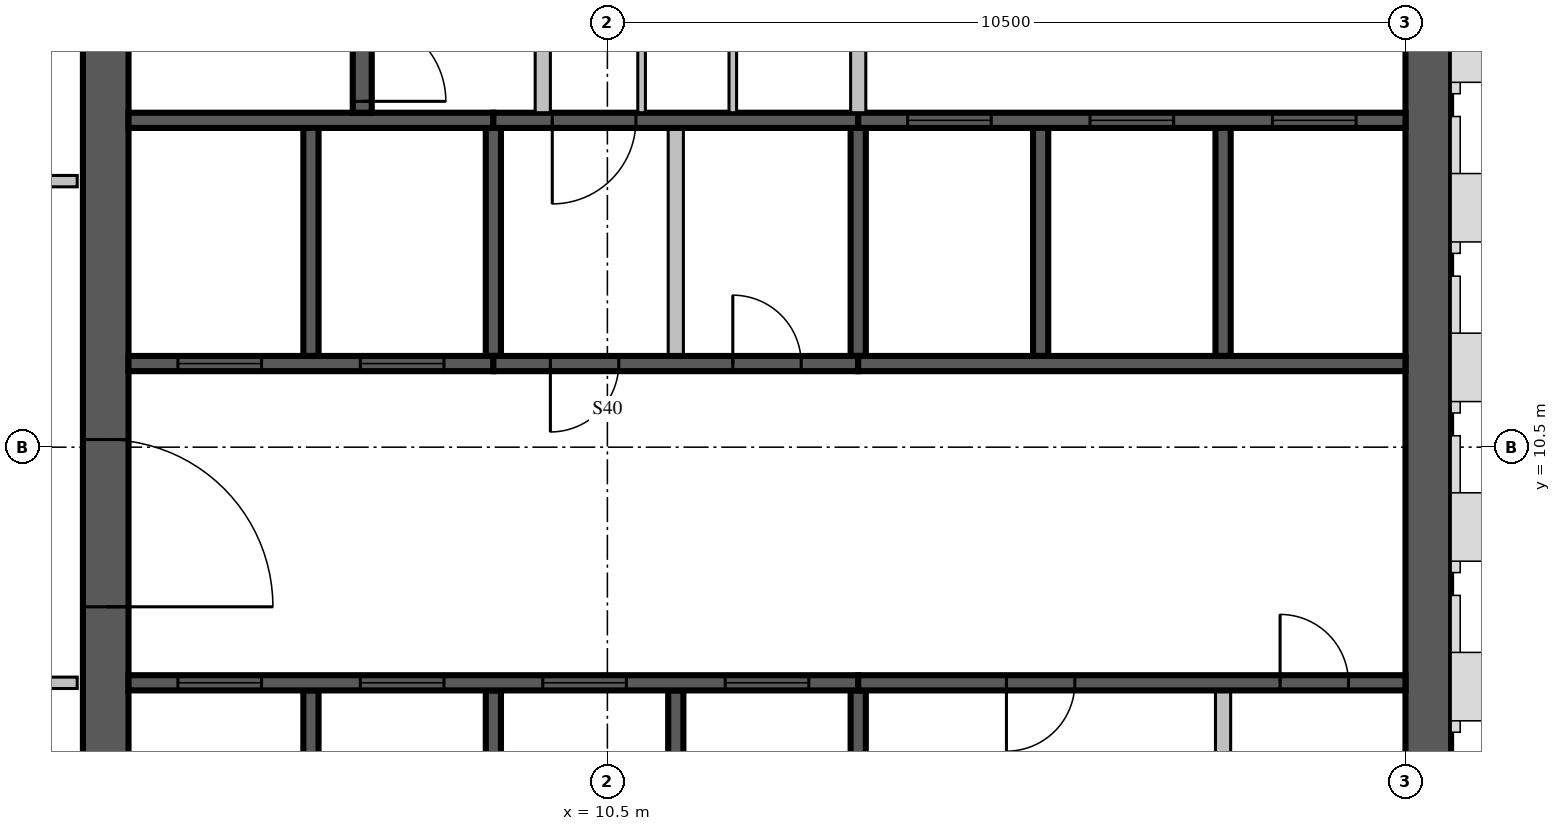
"""IFC4 building model, lengths in metres.
Left out: names, types, materials, properties, quantities, classifications, styles, units other than length and angle.
Written with IfcOpenShell. Run it as: python <this file> out.ifc"""

import sys

from ifc_helpers import new_model, si_unit, direction, frame, frame_2d, origin, place, context, subcontext, project, spatial, rectangle, extrude, source, transform, mapped, element, fill, save


model = new_model("IFC4")
c1 = context("Model", 3, precision=1e-05, world=origin(), true_north=direction((0.0, 1.0)))
c2 = subcontext(c1, "Body", "Model", "MODEL_VIEW")
j1 = project(units=[si_unit("LENGTHUNIT", "METRE"), si_unit("PLANEANGLEUNIT", "RADIAN")], contexts=[c1])
p1 = place(None, origin())
s1 = spatial("IfcSite", under=j1, at=p1, CompositionType="ELEMENT")
p2 = place(p1, origin())
s2 = spatial("IfcBuilding", under=s1, at=p2, CompositionType="ELEMENT")
p3 = place(p2, frame((0.0, 0.0, 340.5)))
s3 = spatial("IfcBuildingStorey", under=s2, at=p3, CompositionType="ELEMENT", Elevation=340.5)
m1 = source(origin(), c2, "Body", "SweptSolid", [
    extrude(rectangle(XDim=17.4, YDim=0.6, at=frame_2d((8.7, 0.0))), origin(), (0.0, 0.0, 1.0), 3.5),
])
p4 = place(p3, frame((3.9, 4.2, 0.0), z_axis=(0.0, 0.0, 1.0), x_axis=(0.0, 1.0, 0.0)))
e1 = element("IfcWall", 1, at=p4, inside=s3, PredefinedType="SHEAR", context=c2, shape_type="MappedRepresentation", body=[
    mapped(m1, transform((0.0, 0.0, 0.0), scale=1.0)),
])
m2 = source(origin(), c2, "Body", "SweptSolid", [
    extrude(rectangle(XDim=2.2, YDim=2.1, at=frame_2d((1.1, 1.05))), frame((0.0, 0.31, 0.0), z_axis=(0.0, -1.0, 0.0), x_axis=(1.0, 0.0, 0.0)), (0.0, 0.0, 1.0), 0.62),
])
p5 = place(p4, frame((4.2, 0.0, 0.0)))
e2 = element("IfcOpeningElement", 2, at=p5, cuts=e1, PredefinedType="OPENING", context=c2, shape_type="MappedRepresentation", body=[
    mapped(m2, transform((0.0, 0.0, 0.0), scale=1.0)),
])
m3 = source(origin(), c2, "Body", "SweptSolid", [
    extrude(rectangle(XDim=16.8, YDim=0.6, at=frame_2d((8.4, 0.0))), origin(), (0.0, 0.0, 1.0), 3.5),
])
p6 = place(p3, frame((21.3, 4.2, 0.0), z_axis=(0.0, 0.0, 1.0), x_axis=(0.0, 1.0, 0.0)))
e3 = element("IfcWall", 3, at=p6, inside=s3, PredefinedType="SHEAR", context=c2, shape_type="MappedRepresentation", body=[
    mapped(m3, transform((0.0, 0.0, 0.0), scale=1.0)),
])
m4 = source(origin(), c2, "Body", "SweptSolid", [
    extrude(rectangle(XDim=1.2, YDim=2.4, at=frame_2d((0.6, 1.2))), frame((0.0, 0.31, 0.0), z_axis=(0.0, -1.0, 0.0), x_axis=(1.0, 0.0, 0.0)), (0.0, 0.0, 1.0), 0.62),
])
p7 = place(p6, frame((12.0, 0.0, 0.6)))
e4 = element("IfcOpeningElement", 4, at=p7, cuts=e3, PredefinedType="OPENING", context=c2, shape_type="MappedRepresentation", body=[
    mapped(m4, transform((0.0, 0.0, 0.0), scale=1.0)),
])
m5 = source(origin(), c2, "Body", "SweptSolid", [
    extrude(rectangle(XDim=3.1, YDim=0.2, at=frame_2d((1.55, 0.0))), origin(), (0.0, 0.0, 1.0), 3.5),
])
for number, where, z_axis, x_axis in (
    (5, (6.6, 4.2, 0.0), (0.0, 0.0, 1.0), (0.0, 1.0, 0.0)),
    (6, (9.0, 4.2, 0.0), (0.0, 0.0, 1.0), (0.0, 1.0, 0.0)),
    (7, (11.4, 4.2, 0.0), (0.0, 0.0, 1.0), (0.0, 1.0, 0.0)),
):
    element("IfcWall", number, at=place(p3, frame(where, z_axis=z_axis, x_axis=x_axis)), inside=s3, PredefinedType="SOLIDWALL", context=c2, shape_type="MappedRepresentation", body=[
        mapped(m5, transform((0.0, 0.0, 0.0), scale=1.0)),
    ])
m6 = source(origin(), c2, "Body", "SweptSolid", [
    extrude(rectangle(XDim=3.1, YDim=0.2, at=frame_2d((1.55, 0.0))), origin(), (0.0, 0.0, 1.0), 3.1),
])
p8 = place(p3, frame((13.8, 4.2, 0.0), z_axis=(0.0, 0.0, 1.0), x_axis=(0.0, 1.0, 0.0)))
e8 = element("IfcWall", 8, at=p8, inside=s3, PredefinedType="SOLIDWALL", context=c2, shape_type="MappedRepresentation", body=[
    mapped(m6, transform((0.0, 0.0, 0.0), scale=1.0)),
])
m7 = source(origin(), c2, "Body", "SweptSolid", [
    extrude(rectangle(XDim=3.1, YDim=0.2, at=frame_2d((1.55, 0.0))), origin(), (0.0, 0.0, 1.0), 3.1),
])
p9 = place(p3, frame((18.6, 4.2, 0.0), z_axis=(0.0, 0.0, 1.0), x_axis=(0.0, 1.0, 0.0)))
e9 = element("IfcWall", 9, at=p9, inside=s3, PredefinedType="PARTITIONING", context=c2, shape_type="MappedRepresentation", body=[
    mapped(m7, transform((0.0, 0.0, 0.0), scale=1.0)),
])
m8 = source(origin(), c2, "Body", "SweptSolid", [
    extrude(rectangle(XDim=3.0, YDim=0.2, at=frame_2d((1.5, 0.0))), origin(), (0.0, 0.0, 1.0), 3.5),
])
p10 = place(p3, frame((6.6, 11.7, 0.0), z_axis=(0.0, 0.0, 1.0), x_axis=(0.0, 1.0, 0.0)))
e10 = element("IfcWall", 10, at=p10, inside=s3, PredefinedType="SOLIDWALL", context=c2, shape_type="MappedRepresentation", body=[
    mapped(m8, transform((0.0, 0.0, 0.0), scale=1.0)),
])
m9 = source(origin(), c2, "Body", "SweptSolid", [
    extrude(rectangle(XDim=3.0, YDim=0.2, at=frame_2d((1.5, 0.0))), origin(), (0.0, 0.0, 1.0), 3.1),
])
for number, where, z_axis, x_axis in (
    (11, (9.0, 11.7, 0.0), (0.0, 0.0, 1.0), (0.0, 1.0, 0.0)),
    (12, (13.8, 11.7, 0.0), (0.0, 0.0, 1.0), (0.0, 1.0, 0.0)),
):
    element("IfcWall", number, at=place(p3, frame(where, z_axis=z_axis, x_axis=x_axis)), inside=s3, PredefinedType="SOLIDWALL", context=c2, shape_type="MappedRepresentation", body=[
        mapped(m9, transform((0.0, 0.0, 0.0), scale=1.0)),
    ])
for number, where, z_axis, x_axis in (
    (13, (16.2, 11.7, 0.0), (0.0, 0.0, 1.0), (0.0, 1.0, 0.0)),
    (14, (18.6, 11.7, 0.0), (0.0, 0.0, 1.0), (0.0, 1.0, 0.0)),
):
    element("IfcWall", number, at=place(p3, frame(where, z_axis=z_axis, x_axis=x_axis)), inside=s3, PredefinedType="SOLIDWALL", context=c2, shape_type="MappedRepresentation", body=[
        mapped(m8, transform((0.0, 0.0, 0.0), scale=1.0)),
    ])
m10 = source(origin(), c2, "Body", "SweptSolid", [
    extrude(rectangle(XDim=3.0, YDim=0.2, at=frame_2d((1.5, 0.0))), origin(), (0.0, 0.0, 1.0), 3.1),
])
p11 = place(p3, frame((11.4, 11.7, 0.0), z_axis=(0.0, 0.0, 1.0), x_axis=(0.0, 1.0, 0.0)))
e15 = element("IfcWall", 15, at=p11, inside=s3, PredefinedType="PARTITIONING", context=c2, shape_type="MappedRepresentation", body=[
    mapped(m10, transform((0.0, 0.0, 0.0), scale=1.0)),
])
m11 = source(origin(), c2, "Body", "SweptSolid", [
    extrude(rectangle(XDim=9.6, YDim=0.2, at=frame_2d((4.8, 0.0))), origin(), (0.0, 0.0, 1.0), 3.5),
])
p12 = place(p3, frame((4.2, 7.4, 0.0), z_axis=(0.0, 0.0, 1.0), x_axis=(1.0, 0.0, 0.0)))
e16 = element("IfcWall", 16, at=p12, inside=s3, PredefinedType="SOLIDWALL", context=c2, shape_type="MappedRepresentation", body=[
    mapped(m11, transform((0.0, 0.0, 0.0), scale=1.0)),
])
m12 = source(origin(), c2, "Body", "SweptSolid", [
    extrude(rectangle(XDim=1.1, YDim=2.1, at=frame_2d((0.55, 1.05))), frame((0.0, 0.11, 0.0), z_axis=(0.0, -1.0, 0.0), x_axis=(1.0, 0.0, 0.0)), (0.0, 0.0, 1.0), 0.22),
])
p13 = place(p12, frame((0.65, 0.0, 0.0)))
e17 = element("IfcOpeningElement", 17, at=p13, cuts=e16, PredefinedType="OPENING", context=c2, shape_type="MappedRepresentation", body=[
    mapped(m12, transform((0.0, 0.0, 0.0), scale=1.0)),
])
p14 = place(p12, frame((3.05, 0.0, 0.0)))
e18 = element("IfcOpeningElement", 18, at=p14, cuts=e16, PredefinedType="OPENING", context=c2, shape_type="MappedRepresentation", body=[
    mapped(m12, transform((0.0, 0.0, 0.0), scale=1.0)),
])
p15 = place(p12, frame((5.45, 0.0, 0.0)))
e19 = element("IfcOpeningElement", 19, at=p15, cuts=e16, PredefinedType="OPENING", context=c2, shape_type="MappedRepresentation", body=[
    mapped(m12, transform((0.0, 0.0, 0.0), scale=1.0)),
])
p16 = place(p12, frame((7.85, 0.0, 0.0)))
e20 = element("IfcOpeningElement", 20, at=p16, cuts=e16, PredefinedType="OPENING", context=c2, shape_type="MappedRepresentation", body=[
    mapped(m12, transform((0.0, 0.0, 0.0), scale=1.0)),
])
m13 = source(origin(), c2, "Body", "SweptSolid", [
    extrude(rectangle(XDim=7.2, YDim=0.2, at=frame_2d((3.6, 0.0))), origin(), (0.0, 0.0, 1.0), 3.1),
])
p17 = place(p3, frame((13.8, 7.4, 0.0), z_axis=(0.0, 0.0, 1.0), x_axis=(1.0, 0.0, 0.0)))
e21 = element("IfcWall", 21, at=p17, inside=s3, PredefinedType="SOLIDWALL", context=c2, shape_type="MappedRepresentation", body=[
    mapped(m13, transform((0.0, 0.0, 0.0), scale=1.0)),
])
m14 = source(origin(), c2, "Body", "SweptSolid", [
    extrude(rectangle(XDim=0.9, YDim=2.1, at=frame_2d((0.45, 1.05))), frame((0.0, 0.11, 0.0), z_axis=(0.0, -1.0, 0.0), x_axis=(1.0, 0.0, 0.0)), (0.0, 0.0, 1.0), 0.22),
])
p18 = place(p17, frame((1.95, 0.0, 0.0)))
e22 = element("IfcOpeningElement", 22, at=p18, cuts=e21, PredefinedType="OPENING", context=c2, shape_type="MappedRepresentation", body=[
    mapped(m14, transform((0.0, 0.0, 0.0), scale=1.0)),
])
p19 = place(p17, frame((5.55, 0.0, 0.0)))
e23 = element("IfcOpeningElement", 23, at=p19, cuts=e21, PredefinedType="OPENING", context=c2, shape_type="MappedRepresentation", body=[
    mapped(m14, transform((0.0, 0.0, 0.0), scale=1.0)),
])
m15 = source(origin(), c2, "Body", "SweptSolid", [
    extrude(rectangle(XDim=4.8, YDim=0.2, at=frame_2d((2.4, 0.0))), origin(), (0.0, 0.0, 1.0), 3.5),
])
p20 = place(p3, frame((4.2, 11.6, 0.0), z_axis=(0.0, 0.0, 1.0), x_axis=(1.0, 0.0, 0.0)))
e24 = element("IfcWall", 24, at=p20, inside=s3, PredefinedType="SOLIDWALL", context=c2, shape_type="MappedRepresentation", body=[
    mapped(m15, transform((0.0, 0.0, 0.0), scale=1.0)),
])
p21 = place(p20, frame((0.65, 0.0, 0.0)))
e25 = element("IfcOpeningElement", 25, at=p21, cuts=e24, PredefinedType="OPENING", context=c2, shape_type="MappedRepresentation", body=[
    mapped(m12, transform((0.0, 0.0, 0.0), scale=1.0)),
])
p22 = place(p20, frame((3.05, 0.0, 0.0)))
e26 = element("IfcOpeningElement", 26, at=p22, cuts=e24, PredefinedType="OPENING", context=c2, shape_type="MappedRepresentation", body=[
    mapped(m12, transform((0.0, 0.0, 0.0), scale=1.0)),
])
m16 = source(origin(), c2, "Body", "SweptSolid", [
    extrude(rectangle(XDim=4.8, YDim=0.2, at=frame_2d((2.4, 0.0))), origin(), (0.0, 0.0, 1.0), 3.1),
])
p23 = place(p3, frame((9.0, 11.6, 0.0), z_axis=(0.0, 0.0, 1.0), x_axis=(1.0, 0.0, 0.0)))
e27 = element("IfcWall", 27, at=p23, inside=s3, PredefinedType="SOLIDWALL", context=c2, shape_type="MappedRepresentation", body=[
    mapped(m16, transform((0.0, 0.0, 0.0), scale=1.0)),
])
p24 = place(p23, frame((0.75, 0.0, 0.0)))
e28 = element("IfcOpeningElement", 28, at=p24, cuts=e27, PredefinedType="OPENING", context=c2, shape_type="MappedRepresentation", body=[
    mapped(m14, transform((0.0, 0.0, 0.0), scale=1.0)),
])
p25 = place(p23, frame((3.15, 0.0, 0.0)))
e29 = element("IfcOpeningElement", 29, at=p25, cuts=e27, PredefinedType="OPENING", context=c2, shape_type="MappedRepresentation", body=[
    mapped(m14, transform((0.0, 0.0, 0.0), scale=1.0)),
])
m17 = source(origin(), c2, "Body", "SweptSolid", [
    extrude(rectangle(XDim=7.2, YDim=0.2, at=frame_2d((3.6, 0.0))), origin(), (0.0, 0.0, 1.0), 3.5),
])
p26 = place(p3, frame((13.8, 11.6, 0.0), z_axis=(0.0, 0.0, 1.0), x_axis=(1.0, 0.0, 0.0)))
e30 = element("IfcWall", 30, at=p26, inside=s3, PredefinedType="SOLIDWALL", context=c2, shape_type="MappedRepresentation", body=[
    mapped(m17, transform((0.0, 0.0, 0.0), scale=1.0)),
])
p27 = place(p3, frame((4.2, 14.8, 0.0), z_axis=(0.0, 0.0, 1.0), x_axis=(1.0, 0.0, 0.0)))
e31 = element("IfcWall", 31, at=p27, inside=s3, PredefinedType="SOLIDWALL", context=c2, shape_type="MappedRepresentation", body=[
    mapped(m15, transform((0.0, 0.0, 0.0), scale=1.0)),
])
p28 = place(p3, frame((9.0, 14.8, 0.0), z_axis=(0.0, 0.0, 1.0), x_axis=(1.0, 0.0, 0.0)))
e32 = element("IfcWall", 32, at=p28, inside=s3, PredefinedType="SOLIDWALL", context=c2, shape_type="MappedRepresentation", body=[
    mapped(m16, transform((0.0, 0.0, 0.0), scale=1.0)),
])
p29 = place(p28, frame((0.775, 0.0, 0.0)))
e33 = element("IfcOpeningElement", 33, at=p29, cuts=e32, PredefinedType="OPENING", context=c2, shape_type="MappedRepresentation", body=[
    mapped(m12, transform((0.0, 0.0, 0.0), scale=1.0)),
])
p30 = place(p3, frame((13.8, 14.8, 0.0), z_axis=(0.0, 0.0, 1.0), x_axis=(1.0, 0.0, 0.0)))
e34 = element("IfcWall", 34, at=p30, inside=s3, PredefinedType="SOLIDWALL", context=c2, shape_type="MappedRepresentation", body=[
    mapped(m17, transform((0.0, 0.0, 0.0), scale=1.0)),
])
p31 = place(p30, frame((0.65, 0.0, 0.0)))
e35 = element("IfcOpeningElement", 35, at=p31, cuts=e34, PredefinedType="OPENING", context=c2, shape_type="MappedRepresentation", body=[
    mapped(m12, transform((0.0, 0.0, 0.0), scale=1.0)),
])
p32 = place(p30, frame((3.05, 0.0, 0.0)))
e36 = element("IfcOpeningElement", 36, at=p32, cuts=e34, PredefinedType="OPENING", context=c2, shape_type="MappedRepresentation", body=[
    mapped(m12, transform((0.0, 0.0, 0.0), scale=1.0)),
])
p33 = place(p30, frame((5.45, 0.0, 0.0)))
e37 = element("IfcOpeningElement", 37, at=p33, cuts=e34, PredefinedType="OPENING", context=c2, shape_type="MappedRepresentation", body=[
    mapped(m12, transform((0.0, 0.0, 0.0), scale=1.0)),
])
m18 = source(origin(), c2, "Body", "SweptSolid", [
    extrude(rectangle(XDim=6.6, YDim=0.25, at=frame_2d((3.3, 0.0))), origin(), (0.0, 0.0, 1.0), 3.1),
])
p34 = place(p3, frame((7.275, 14.9, 0.0), z_axis=(0.0, 0.0, 1.0), x_axis=(0.0, 1.0, 0.0)))
e38 = element("IfcWall", 38, at=p34, inside=s3, PredefinedType="SOLIDWALL", context=c2, shape_type="MappedRepresentation", body=[
    mapped(m18, transform((0.0, 0.0, 0.0), scale=1.0)),
])
m19 = source(origin(), c2, "Body", "SweptSolid", [
    extrude(rectangle(XDim=1.1, YDim=2.1, at=frame_2d((0.55, 1.05))), frame((0.0, 0.135, 0.0), z_axis=(0.0, -1.0, 0.0), x_axis=(1.0, 0.0, 0.0)), (0.0, 0.0, 1.0), 0.27),
])
p35 = place(p34, frame((0.15, 0.0, 0.0)))
e39 = element("IfcOpeningElement", 39, at=p35, cuts=e38, PredefinedType="OPENING", context=c2, shape_type="MappedRepresentation", body=[
    mapped(m19, transform((0.0, 0.0, 0.0), scale=1.0)),
])
for number, where, z_axis, x_axis in (
    (40, (9.65, 14.9, 0.0), (0.0, 0.0, 1.0), (0.0, 1.0, 0.0)),
    (41, (13.8, 14.9, 0.0), (0.0, 0.0, 1.0), (0.0, 1.0, 0.0)),
):
    element("IfcWall", number, at=place(p3, frame(where, z_axis=z_axis, x_axis=x_axis)), inside=s3, PredefinedType="PARTITIONING", context=c2, shape_type="MappedRepresentation", body=[
        mapped(m10, transform((0.0, 0.0, 0.0), scale=1.0)),
    ])
m20 = source(origin(), c2, "Body", "SweptSolid", [
    extrude(rectangle(XDim=3.0, YDim=0.1, at=frame_2d((1.5, 0.0))), origin(), (0.0, 0.0, 1.0), 3.1),
])
for number, where, z_axis, x_axis in (
    (42, (10.95, 14.9, 0.0), (0.0, 0.0, 1.0), (0.0, 1.0, 0.0)),
    (43, (12.15, 14.9, 0.0), (0.0, 0.0, 1.0), (0.0, 1.0, 0.0)),
):
    element("IfcWall", number, at=place(p3, frame(where, z_axis=z_axis, x_axis=x_axis)), inside=s3, PredefinedType="PARTITIONING", context=c2, shape_type="MappedRepresentation", body=[
        mapped(m20, transform((0.0, 0.0, 0.0), scale=1.0)),
    ])
m21 = source(origin(), c2, "Body", "SweptSolid", [
    extrude(rectangle(XDim=3.225, YDim=0.15, at=frame_2d((1.613, 0.0))), origin(), (0.0, 0.0, 1.0), 3.1),
])
p36 = place(p3, frame((0.3, 7.4, 0.0), z_axis=(0.0, 0.0, 1.0), x_axis=(1.0, 0.0, 0.0)))
e44 = element("IfcWall", 44, at=p36, inside=s3, PredefinedType="PARTITIONING", context=c2, shape_type="MappedRepresentation", body=[
    mapped(m21, transform((0.0, 0.0, 0.0), scale=1.0)),
])
m22 = source(origin(), c2, "Body", "SweptSolid", [
    extrude(rectangle(XDim=0.9, YDim=2.1, at=frame_2d((0.45, 1.05))), frame((0.0, 0.085, 0.0), z_axis=(0.0, -1.0, 0.0), x_axis=(1.0, 0.0, 0.0)), (0.0, 0.0, 1.0), 0.17),
])
p37 = place(p36, frame((1.2, 0.0, 0.0)))
e45 = element("IfcOpeningElement", 45, at=p37, cuts=e44, PredefinedType="OPENING", context=c2, shape_type="MappedRepresentation", body=[
    mapped(m22, transform((0.0, 0.0, 0.0), scale=1.0)),
])
p38 = place(p3, frame((0.3, 14.0, 0.0), z_axis=(0.0, 0.0, 1.0), x_axis=(1.0, 0.0, 0.0)))
e46 = element("IfcWall", 46, at=p38, inside=s3, PredefinedType="PARTITIONING", context=c2, shape_type="MappedRepresentation", body=[
    mapped(m21, transform((0.0, 0.0, 0.0), scale=1.0)),
])
p39 = place(p38, frame((1.2, 0.0, 0.0)))
e47 = element("IfcOpeningElement", 47, at=p39, cuts=e46, PredefinedType="OPENING", context=c2, shape_type="MappedRepresentation", body=[
    mapped(m22, transform((0.0, 0.0, 0.0), scale=1.0)),
])
m23 = source(origin(), c2, "Body", "SweptSolid", [
    extrude(rectangle(XDim=1.1, YDim=2.1, at=frame_2d((0.55, 1.05))), frame((0.0, 0.025, 0.0), z_axis=(0.0, -1.0, 0.0), x_axis=(1.0, 0.0, 0.0)), (0.0, 0.0, 1.0), 0.05),
])
p40 = place(p13, origin())
e48 = element("IfcDoor", 48, at=p40, inside=s3, OperationType="SLIDING_TO_LEFT", PredefinedType="DOOR", context=c2, shape_type="MappedRepresentation", body=[
    mapped(m23, transform((0.0, 0.0, 0.0), scale=1.0)),
])
fill(e17, e48)
p41 = place(p14, origin())
e49 = element("IfcDoor", 49, at=p41, inside=s3, OperationType="SLIDING_TO_LEFT", PredefinedType="DOOR", context=c2, shape_type="MappedRepresentation", body=[
    mapped(m23, transform((0.0, 0.0, 0.0), scale=1.0)),
])
fill(e18, e49)
p42 = place(p15, origin())
e50 = element("IfcDoor", 50, at=p42, inside=s3, OperationType="SLIDING_TO_LEFT", PredefinedType="DOOR", context=c2, shape_type="MappedRepresentation", body=[
    mapped(m23, transform((0.0, 0.0, 0.0), scale=1.0)),
])
fill(e19, e50)
p43 = place(p16, origin())
e51 = element("IfcDoor", 51, at=p43, inside=s3, OperationType="SLIDING_TO_LEFT", PredefinedType="DOOR", context=c2, shape_type="MappedRepresentation", body=[
    mapped(m23, transform((0.0, 0.0, 0.0), scale=1.0)),
])
fill(e20, e51)
m24 = source(origin(), c2, "Body", "SweptSolid", [
    extrude(rectangle(XDim=0.9, YDim=2.1, at=frame_2d((0.45, 1.05))), frame((0.0, 0.025, 0.0), z_axis=(0.0, -1.0, 0.0), x_axis=(1.0, 0.0, 0.0)), (0.0, 0.0, 1.0), 0.05),
])
p44 = place(p18, origin())
e52 = element("IfcDoor", 52, at=p44, inside=s3, OperationType="SINGLE_SWING_RIGHT", PredefinedType="DOOR", context=c2, shape_type="MappedRepresentation", body=[
    mapped(m24, transform((0.0, 0.0, 0.0), scale=1.0)),
])
fill(e22, e52)
p45 = place(p19, origin())
e53 = element("IfcDoor", 53, at=p45, inside=s3, OperationType="SINGLE_SWING_LEFT", PredefinedType="DOOR", context=c2, shape_type="MappedRepresentation", body=[
    mapped(m24, transform((0.0, 0.0, 0.0), scale=1.0)),
])
fill(e23, e53)
p46 = place(p21, origin())
e54 = element("IfcDoor", 54, at=p46, inside=s3, OperationType="SLIDING_TO_LEFT", PredefinedType="DOOR", context=c2, shape_type="MappedRepresentation", body=[
    mapped(m23, transform((0.0, 0.0, 0.0), scale=1.0)),
])
fill(e25, e54)
p47 = place(p22, origin())
e55 = element("IfcDoor", 55, at=p47, inside=s3, OperationType="SLIDING_TO_LEFT", PredefinedType="DOOR", context=c2, shape_type="MappedRepresentation", body=[
    mapped(m23, transform((0.0, 0.0, 0.0), scale=1.0)),
])
fill(e26, e55)
p48 = place(p24, origin())
e56 = element("IfcDoor", 56, at=p48, inside=s3, OperationType="SINGLE_SWING_RIGHT", PredefinedType="DOOR", context=c2, shape_type="MappedRepresentation", body=[
    mapped(m24, transform((0.0, 0.0, 0.0), scale=1.0)),
])
fill(e28, e56)
p49 = place(p25, origin())
e57 = element("IfcDoor", 57, at=p49, inside=s3, OperationType="SINGLE_SWING_LEFT", PredefinedType="DOOR", context=c2, shape_type="MappedRepresentation", body=[
    mapped(m24, transform((0.0, 0.0, 0.0), scale=1.0)),
])
fill(e29, e57)
p50 = place(p29, origin())
e58 = element("IfcDoor", 58, at=p50, inside=s3, OperationType="SINGLE_SWING_RIGHT", PredefinedType="DOOR", context=c2, shape_type="MappedRepresentation", body=[
    mapped(m23, transform((0.0, 0.0, 0.0), scale=1.0)),
])
fill(e33, e58)
p51 = place(p31, origin())
e59 = element("IfcDoor", 59, at=p51, inside=s3, OperationType="SLIDING_TO_LEFT", PredefinedType="DOOR", context=c2, shape_type="MappedRepresentation", body=[
    mapped(m23, transform((0.0, 0.0, 0.0), scale=1.0)),
])
fill(e35, e59)
p52 = place(p32, origin())
e60 = element("IfcDoor", 60, at=p52, inside=s3, OperationType="SLIDING_TO_LEFT", PredefinedType="DOOR", context=c2, shape_type="MappedRepresentation", body=[
    mapped(m23, transform((0.0, 0.0, 0.0), scale=1.0)),
])
fill(e36, e60)
p53 = place(p33, origin())
e61 = element("IfcDoor", 61, at=p53, inside=s3, OperationType="SLIDING_TO_LEFT", PredefinedType="DOOR", context=c2, shape_type="MappedRepresentation", body=[
    mapped(m23, transform((0.0, 0.0, 0.0), scale=1.0)),
])
fill(e37, e61)
p54 = place(p35, origin())
e62 = element("IfcDoor", 62, at=p54, inside=s3, OperationType="SINGLE_SWING_RIGHT", PredefinedType="DOOR", context=c2, shape_type="MappedRepresentation", body=[
    mapped(m23, transform((0.0, 0.0, 0.0), scale=1.0)),
])
fill(e39, e62)
m25 = source(origin(), c2, "Body", "SweptSolid", [
    extrude(rectangle(XDim=2.2, YDim=2.1, at=frame_2d((1.1, 1.05))), frame((0.0, 0.025, 0.0), z_axis=(0.0, -1.0, 0.0), x_axis=(1.0, 0.0, 0.0)), (0.0, 0.0, 1.0), 0.05),
])
p55 = place(p5, origin())
e63 = element("IfcDoor", 63, at=p55, inside=s3, OperationType="DOUBLE_DOOR_SINGLE_SWING", PredefinedType="DOOR", context=c2, shape_type="MappedRepresentation", body=[
    mapped(m25, transform((0.0, 0.0, 0.0), scale=1.0)),
])
fill(e2, e63)
save(model, sys.argv[1])
